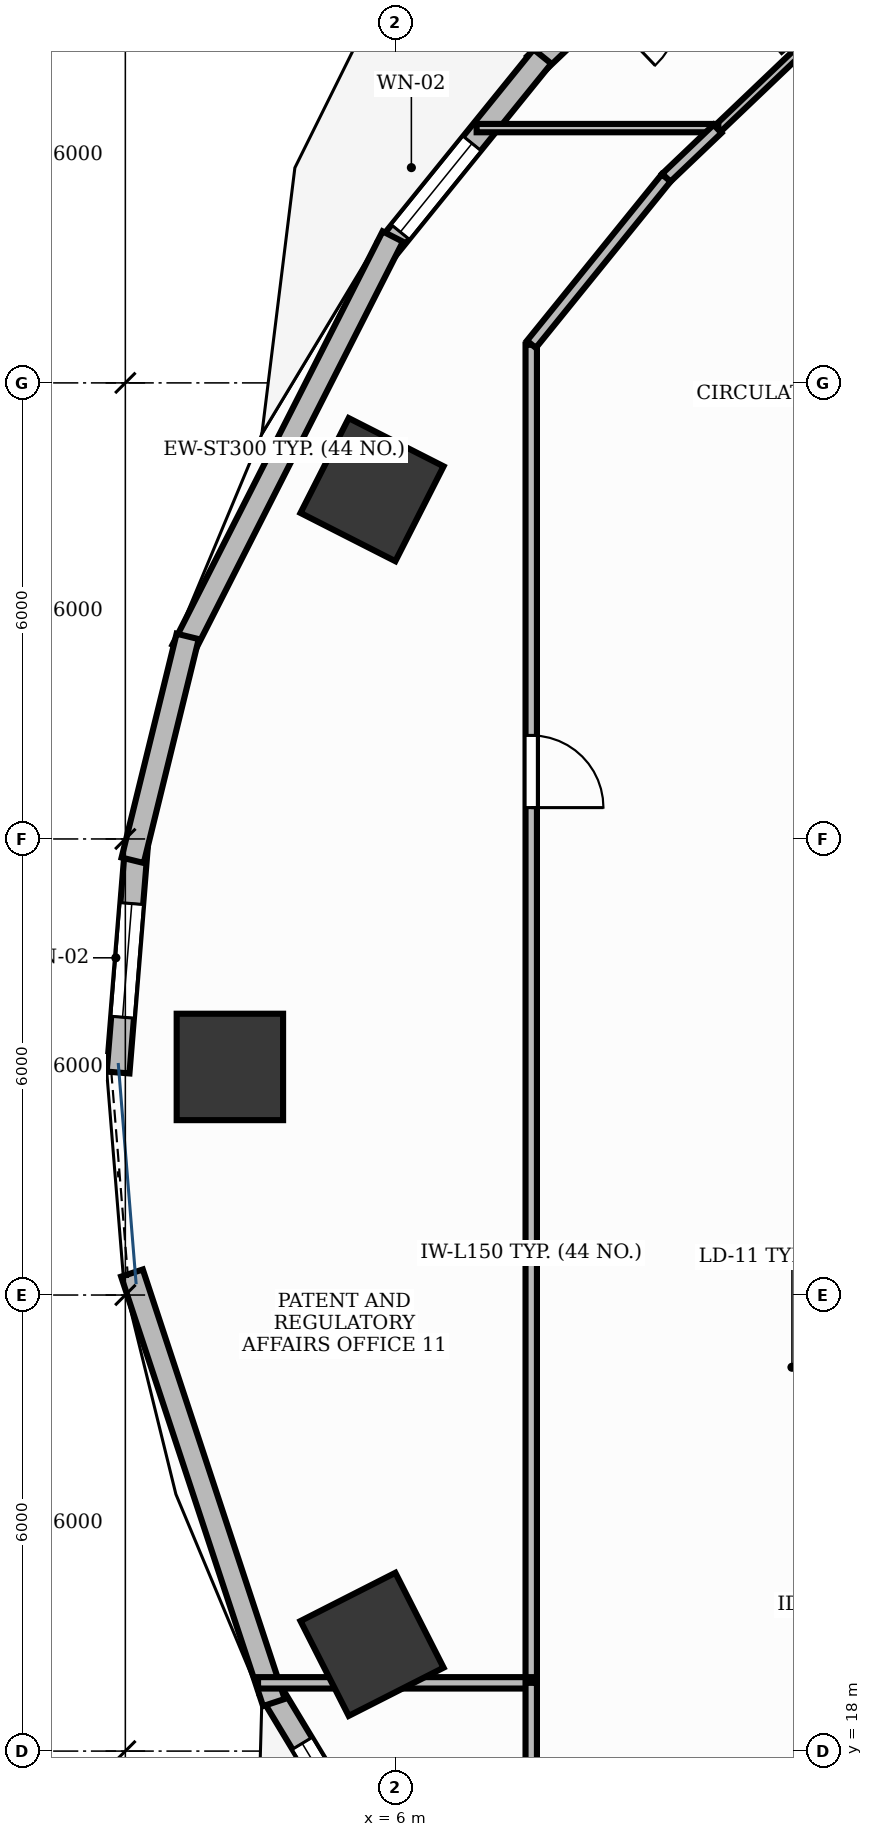
"""IFC4 building model, lengths in metres.
Left out: names, types, materials, properties, quantities, classifications, styles, units other than length and angle.
Written with IfcOpenShell. Run it as: python <this file> out.ifc"""

import sys

from ifc_helpers import new_model, si_unit, direction, frame, frame_2d, origin, origin_2d, place, context, subcontext, project, spatial, rectangle, extrude, element, fill, save


model = new_model("IFC4")
c1 = context("Model", 3, precision=1e-05, world=origin(), true_north=direction((0.0, 1.0)))
c2 = subcontext(c1, "Body", "Model", "MODEL_VIEW")
j1 = project(units=[si_unit("LENGTHUNIT", "METRE"), si_unit("PLANEANGLEUNIT", "RADIAN")], contexts=[c1])
p1 = place(None, origin())
s1 = spatial("IfcSite", under=j1, at=p1, CompositionType="ELEMENT")
p2 = place(p1, origin())
s2 = spatial("IfcBuilding", under=s1, at=p2, CompositionType="ELEMENT")
p3 = place(p2, frame((0.0, 0.0, 46.8)))
s3 = spatial("IfcBuildingStorey", under=s2, at=p3, CompositionType="ELEMENT", Elevation=46.8)
for number, where, z_axis, x_axis in (
    (1, (5.696, 34.596, -0.0), (0.0, 0.0, 1.0), (0.453, 0.891, 0.0)),
    (2, (3.825, 27.001, -0.0), (0.0, 0.0, 1.0), (0.0, 1.0, 0.0)),
    (3, (5.696, 19.404, -0.0), (0.0, 0.0, 1.0), (-0.453, 0.891, 0.0)),
):
    element("IfcColumn", number, at=place(p3, frame(where, z_axis=z_axis, x_axis=x_axis)), inside=s3, PredefinedType="COLUMN", context=c2, shape_type="SweptSolid", body=[
        extrude(rectangle(XDim=1.4, YDim=1.4, at=origin_2d()), origin(), (0.0, 0.0, 1.0), 3.901),
    ])
p4 = place(p3, frame((10.276, 42.512, 0.0), z_axis=(0.0, 0.0, 1.0), x_axis=(-0.723678516117, -0.690137236578, 0.0)))
e4 = element("IfcWall", 4, at=p4, inside=s3, PredefinedType="STANDARD", context=c2, shape_type="SweptSolid", body=[
    extrude(rectangle(XDim=3.363, YDim=0.3, at=frame_2d((1.681, 0.0))), origin(), (0.0, 0.0, 1.0), 3.9),
])
p5 = place(p4, frame((1.131, 0.0, 0.0)))
e5 = element("IfcOpeningElement", 5, at=p5, cuts=e4, PredefinedType="OPENING", context=c2, shape_type="SweptSolid", body=[
    extrude(rectangle(XDim=1.1, YDim=2.15, at=frame_2d((0.55, 1.075))), frame((0.0, 0.165, 0.0), z_axis=(0.0, -1.0, 0.0), x_axis=(1.0, 0.0, 0.0)), (0.0, 0.0, 1.0), 0.33),
])
p6 = place(p3, frame((7.938, 40.294, 0.0), z_axis=(0.0, 0.0, 1.0), x_axis=(-0.629295540187, -0.777166084631, 0.0)))
e6 = element("IfcWall", 6, at=p6, inside=s3, PredefinedType="STANDARD", context=c2, shape_type="SweptSolid", body=[
    extrude(rectangle(XDim=3.248, YDim=0.3, at=frame_2d((1.624, 0.0))), origin(), (0.0, 0.0, 1.0), 3.9),
])
p7 = place(p6, frame((1.472, 0.0, 0.95)))
e7 = element("IfcOpeningElement", 7, at=p7, cuts=e6, PredefinedType="OPENING", context=c2, shape_type="SweptSolid", body=[
    extrude(rectangle(XDim=1.5, YDim=1.8, at=frame_2d((0.75, 0.9))), frame((0.0, 0.165, 0.0), z_axis=(0.0, -1.0, 0.0), x_axis=(1.0, 0.0, 0.0)), (0.0, 0.0, 1.0), 0.33),
])
p8 = place(p3, frame((2.594, 29.878, 0.0), z_axis=(0.0, 0.0, 1.0), x_axis=(-0.08090887827, -0.996721502435, 0.0)))
e8 = element("IfcWall", 8, at=p8, inside=s3, PredefinedType="STANDARD", context=c2, shape_type="SweptSolid", body=[
    extrude(rectangle(XDim=2.96, YDim=0.3, at=frame_2d((1.48, 0.0))), origin(), (0.0, 0.0, 1.0), 3.47),
])
p9 = place(p8, frame((0.73, 0.0, 0.95)))
e9 = element("IfcOpeningElement", 9, at=p9, cuts=e8, PredefinedType="OPENING", context=c2, shape_type="SweptSolid", body=[
    extrude(rectangle(XDim=1.5, YDim=1.8, at=frame_2d((0.75, 0.9))), frame((0.0, 0.165, 0.0), z_axis=(0.0, -1.0, 0.0), x_axis=(1.0, 0.0, 0.0)), (0.0, 0.0, 1.0), 0.33),
])
p10 = place(p3, frame((4.352, 18.805, 0.0), z_axis=(0.0, 0.0, 1.0), x_axis=(0.516447962267, -0.856318575222, 0.0)))
e10 = element("IfcWall", 10, at=p10, inside=s3, PredefinedType="STANDARD", context=c2, shape_type="SweptSolid", body=[
    extrude(rectangle(XDim=3.143, YDim=0.3, at=frame_2d((1.571, 0.0))), origin(), (0.0, 0.0, 1.0), 3.9),
])
p11 = place(p10, frame((0.821, 0.0, 0.95)))
e11 = element("IfcOpeningElement", 11, at=p11, cuts=e10, PredefinedType="OPENING", context=c2, shape_type="SweptSolid", body=[
    extrude(rectangle(XDim=1.5, YDim=1.8, at=frame_2d((0.75, 0.9))), frame((0.0, 0.165, 0.0), z_axis=(0.0, -1.0, 0.0), x_axis=(1.0, 0.0, 0.0)), (0.0, 0.0, 1.0), 0.33),
])
p12 = place(p3, frame((5.969, 37.926, 0.0), z_axis=(0.0, 0.0, 1.0), x_axis=(-0.453093111502, -0.891463197395, 0.0)))
e12 = element("IfcWall", 12, at=p12, inside=s3, PredefinedType="STANDARD", context=c2, shape_type="SweptSolid", body=[
    extrude(rectangle(XDim=6.102, YDim=0.3, at=frame_2d((3.051, 0.0))), origin(), (0.0, 0.0, 1.0), 3.47),
])
p13 = place(p3, frame((3.27, 32.665, 0.0), z_axis=(0.0, 0.0, 1.0), x_axis=(-0.23859399274, -0.971119409047, 0.0)))
e13 = element("IfcWall", 13, at=p13, inside=s3, PredefinedType="STANDARD", context=c2, shape_type="SweptSolid", body=[
    extrude(rectangle(XDim=3.033, YDim=0.3, at=frame_2d((1.517, 0.0))), origin(), (0.0, 0.0, 1.0), 3.47),
])
p14 = place(p3, frame((2.537, 24.289, 0.0), z_axis=(0.0, 0.0, 1.0), x_axis=(0.31372816724, -0.949512841978, 0.0)))
e14 = element("IfcWall", 14, at=p14, inside=s3, PredefinedType="STANDARD", context=c2, shape_type="SweptSolid", body=[
    extrude(rectangle(XDim=5.951, YDim=0.3, at=frame_2d((2.976, 0.0))), origin(), (0.0, 0.0, 1.0), 3.9),
])
p15 = place(p3, frame((7.79, 36.501, 0.0), z_axis=(0.0, 0.0, 1.0), x_axis=(0.0, -1.0, 0.0)))
e15 = element("IfcWall", 15, at=p15, inside=s3, PredefinedType="PARTITIONING", context=c2, shape_type="SweptSolid", body=[
    extrude(rectangle(XDim=17.593, YDim=0.15, at=frame_2d((8.797, 0.0))), origin(), (0.0, 0.0, 1.0), 2.91),
])
p16 = place(p15, frame((5.139, 0.0, 0.0)))
e16 = element("IfcOpeningElement", 16, at=p16, cuts=e15, PredefinedType="OPENING", context=c2, shape_type="SweptSolid", body=[
    extrude(rectangle(XDim=0.95, YDim=2.15, at=frame_2d((0.475, 1.075))), frame((0.0, 0.09, 0.0), z_axis=(0.0, -1.0, 0.0), x_axis=(1.0, 0.0, 0.0)), (0.0, 0.0, 1.0), 0.18),
])
p17 = place(p3, frame((4.196, 18.898, 0.0), z_axis=(0.0, 0.0, 1.0), x_axis=(1.0, 0.0, 0.0)))
e17 = element("IfcWall", 17, at=p17, inside=s3, PredefinedType="PARTITIONING", context=c2, shape_type="SweptSolid", body=[
    extrude(rectangle(XDim=3.594, YDim=0.15, at=frame_2d((1.797, 0.0))), origin(), (0.0, 0.0, 1.0), 2.91),
])
p18 = place(p3, frame((7.79, 18.898, 0.0), z_axis=(0.0, 0.0, 1.0), x_axis=(0.0, -1.0, 0.0)))
e18 = element("IfcWall", 18, at=p18, inside=s3, PredefinedType="PARTITIONING", context=c2, shape_type="SweptSolid", body=[
    extrude(rectangle(XDim=1.399, YDim=0.15, at=frame_2d((0.7, 0.0))), origin(), (0.0, 0.0, 1.0), 2.91),
])
p19 = place(p3, frame((11.693, 40.727, 0.0), z_axis=(0.0, 0.0, 1.0), x_axis=(-0.723636479822, -0.690181313185, 0.0)))
e19 = element("IfcWall", 19, at=p19, inside=s3, PredefinedType="MOVABLE", context=c2, shape_type="SweptSolid", body=[
    extrude(rectangle(XDim=1.992, YDim=0.11, at=frame_2d((0.996, 0.0))), origin(), (0.0, 0.0, 1.0), 2.91),
])
p20 = place(p3, frame((10.252, 39.352, 0.0), z_axis=(0.0, 0.0, 1.0), x_axis=(-1.0, 0.0, 0.0)))
e20 = element("IfcWall", 20, at=p20, inside=s3, PredefinedType="MOVABLE", context=c2, shape_type="SweptSolid", body=[
    extrude(rectangle(XDim=3.18, YDim=0.11, at=frame_2d((1.59, 0.0))), origin(), (0.0, 0.0, 1.0), 2.91),
])
p21 = place(p3, frame((10.241, 39.342, 0.0), z_axis=(0.0, 0.0, 1.0), x_axis=(-0.723783132033, -0.690027519585, 0.0)))
e21 = element("IfcWall", 21, at=p21, inside=s3, PredefinedType="PARTITIONING", context=c2, shape_type="SweptSolid", body=[
    extrude(rectangle(XDim=0.933, YDim=0.15, at=frame_2d((0.467, 0.0))), origin(), (0.0, 0.0, 1.0), 2.91),
])
p22 = place(p3, frame((9.565, 38.697, 0.0), z_axis=(0.0, 0.0, 1.0), x_axis=(-0.629270515505, -0.777186347227, 0.0)))
e22 = element("IfcWall", 22, at=p22, inside=s3, PredefinedType="PARTITIONING", context=c2, shape_type="SweptSolid", body=[
    extrude(rectangle(XDim=2.817, YDim=0.15, at=frame_2d((1.409, 0.0))), origin(), (0.0, 0.0, 1.0), 2.91),
])
p23 = place(p7, origin())
e23 = element("IfcWindow", 23, at=p23, inside=s3, PartitioningType="DOUBLE_PANEL_VERTICAL", PredefinedType="WINDOW", context=c2, shape_type="SweptSolid", body=[
    extrude(rectangle(XDim=1.5, YDim=1.8, at=frame_2d((0.75, 0.9))), frame((0.0, 0.03, 0.0), z_axis=(0.0, -1.0, 0.0), x_axis=(1.0, 0.0, 0.0)), (0.0, 0.0, 1.0), 0.06),
])
fill(e7, e23)
p24 = place(p9, origin())
e24 = element("IfcWindow", 24, at=p24, inside=s3, PartitioningType="DOUBLE_PANEL_VERTICAL", PredefinedType="WINDOW", context=c2, shape_type="SweptSolid", body=[
    extrude(rectangle(XDim=1.5, YDim=1.8, at=frame_2d((0.75, 0.9))), frame((0.0, 0.03, 0.0), z_axis=(0.0, -1.0, 0.0), x_axis=(1.0, 0.0, 0.0)), (0.0, 0.0, 1.0), 0.06),
])
fill(e9, e24)
p25 = place(p11, origin())
e25 = element("IfcWindow", 25, at=p25, inside=s3, PartitioningType="DOUBLE_PANEL_VERTICAL", PredefinedType="WINDOW", context=c2, shape_type="SweptSolid", body=[
    extrude(rectangle(XDim=1.5, YDim=1.8, at=frame_2d((0.75, 0.9))), frame((0.0, 0.03, 0.0), z_axis=(0.0, -1.0, 0.0), x_axis=(1.0, 0.0, 0.0)), (0.0, 0.0, 1.0), 0.06),
])
fill(e11, e25)
p26 = place(p16, origin())
e26 = element("IfcDoor", 26, at=p26, inside=s3, OperationType="SINGLE_SWING_RIGHT", PredefinedType="DOOR", context=c2, shape_type="SweptSolid", body=[
    extrude(rectangle(XDim=0.95, YDim=2.15, at=frame_2d((0.475, 1.075))), frame((0.0, 0.025, 0.0), z_axis=(0.0, -1.0, 0.0), x_axis=(1.0, 0.0, 0.0)), (0.0, 0.0, 1.0), 0.05),
])
fill(e16, e26)
save(model, sys.argv[1])
